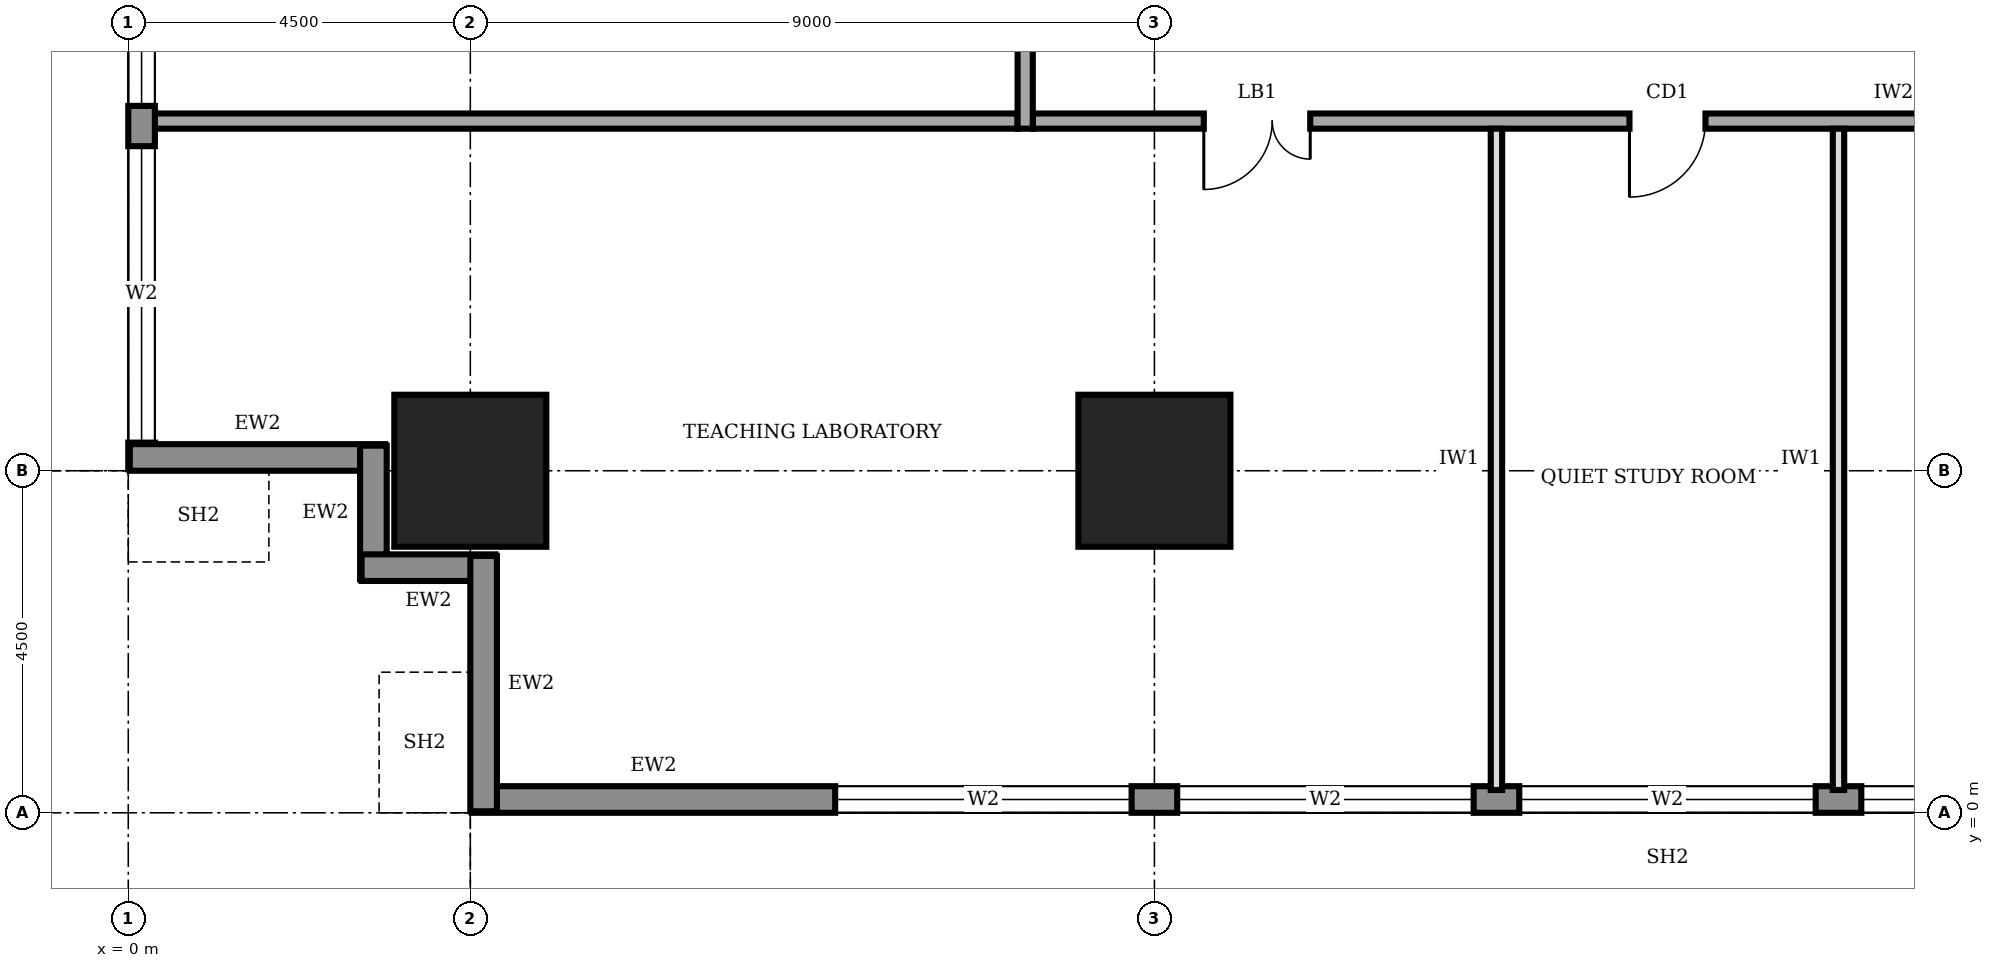
"""IFC4 building model, lengths in metres.
Left out: names, types, materials, properties, quantities, classifications, styles, units other than length and angle.
Written with IfcOpenShell. Run it as: python <this file> out.ifc"""

import sys

from ifc_helpers import new_model, si_unit, direction, frame, frame_2d, origin, origin_2d, place, context, subcontext, project, spatial, rectangle, extrude, element, fill, save


model = new_model("IFC4")
c1 = context("Model", 3, precision=1e-05, world=origin(), true_north=direction((0.0, 1.0)))
c2 = subcontext(c1, "Body", "Model", "MODEL_VIEW")
j1 = project(units=[si_unit("LENGTHUNIT", "METRE"), si_unit("PLANEANGLEUNIT", "RADIAN")], contexts=[c1])
p1 = place(None, origin())
s1 = spatial("IfcSite", under=j1, at=p1, CompositionType="ELEMENT")
p2 = place(p1, origin())
s2 = spatial("IfcBuilding", under=s1, at=p2, CompositionType="ELEMENT")
p3 = place(p2, frame((0.0, 0.0, 65.0)))
s3 = spatial("IfcBuildingStorey", under=s2, at=p3, CompositionType="ELEMENT", Elevation=65.0)
for number, where, z_axis, x_axis in (
    (1, (4.5, 4.5, 0.0), (0.0, 0.0, 1.0), (1.0, 0.0, 0.0)),
    (2, (13.5, 4.5, 0.0), (0.0, 0.0, 1.0), (1.0, 0.0, 0.0)),
):
    element("IfcColumn", number, at=place(p3, frame(where, z_axis=z_axis, x_axis=x_axis)), inside=s3, PredefinedType="COLUMN", context=c2, shape_type="SweptSolid", body=[
        extrude(rectangle(XDim=2.0, YDim=2.0, at=origin_2d()), origin(), (0.0, 0.0, 1.0), 4.0),
    ])
p4 = place(p3, frame((4.52, 0.175, 0.0), z_axis=(0.0, 0.0, 1.0), x_axis=(1.0, 0.0, 0.0)))
e3 = element("IfcWall", 3, at=p4, inside=s3, PredefinedType="STANDARD", context=c2, shape_type="SweptSolid", body=[
    extrude(rectangle(XDim=31.46, YDim=0.35, at=frame_2d((15.73, 0.0))), origin(), (0.0, 0.0, 1.0), 3.75),
])
p5 = place(p4, frame((4.78, 0.0, 0.6)))
e4 = element("IfcOpeningElement", 4, at=p5, cuts=e3, PredefinedType="OPENING", context=c2, shape_type="SweptSolid", body=[
    extrude(rectangle(XDim=3.9, YDim=2.6, at=frame_2d((1.95, 1.3))), frame((0.0, 0.185, 0.0), z_axis=(0.0, -1.0, 0.0), x_axis=(1.0, 0.0, 0.0)), (0.0, 0.0, 1.0), 0.37),
])
p6 = place(p4, frame((9.28, 0.0, 0.6)))
e5 = element("IfcOpeningElement", 5, at=p6, cuts=e3, PredefinedType="OPENING", context=c2, shape_type="SweptSolid", body=[
    extrude(rectangle(XDim=3.9, YDim=2.6, at=frame_2d((1.95, 1.3))), frame((0.0, 0.185, 0.0), z_axis=(0.0, -1.0, 0.0), x_axis=(1.0, 0.0, 0.0)), (0.0, 0.0, 1.0), 0.37),
])
p7 = place(p4, frame((13.78, 0.0, 0.6)))
e6 = element("IfcOpeningElement", 6, at=p7, cuts=e3, PredefinedType="OPENING", context=c2, shape_type="SweptSolid", body=[
    extrude(rectangle(XDim=3.9, YDim=2.6, at=frame_2d((1.95, 1.3))), frame((0.0, 0.185, 0.0), z_axis=(0.0, -1.0, 0.0), x_axis=(1.0, 0.0, 0.0)), (0.0, 0.0, 1.0), 0.37),
])
p8 = place(p4, frame((18.28, 0.0, 0.6)))
e7 = element("IfcOpeningElement", 7, at=p8, cuts=e3, PredefinedType="OPENING", context=c2, shape_type="SweptSolid", body=[
    extrude(rectangle(XDim=3.9, YDim=2.6, at=frame_2d((1.95, 1.3))), frame((0.0, 0.185, 0.0), z_axis=(0.0, -1.0, 0.0), x_axis=(1.0, 0.0, 0.0)), (0.0, 0.0, 1.0), 0.37),
])
p9 = place(p4, frame((22.78, 0.0, 0.6)))
e8 = element("IfcOpeningElement", 8, at=p9, cuts=e3, PredefinedType="OPENING", context=c2, shape_type="SweptSolid", body=[
    extrude(rectangle(XDim=3.9, YDim=2.6, at=frame_2d((1.95, 1.3))), frame((0.0, 0.185, 0.0), z_axis=(0.0, -1.0, 0.0), x_axis=(1.0, 0.0, 0.0)), (0.0, 0.0, 1.0), 0.37),
])
p10 = place(p4, frame((27.21, 0.0, 0.6)))
e9 = element("IfcOpeningElement", 9, at=p10, cuts=e3, PredefinedType="OPENING", context=c2, shape_type="SweptSolid", body=[
    extrude(rectangle(XDim=3.9, YDim=2.6, at=frame_2d((1.95, 1.3))), frame((0.0, 0.185, 0.0), z_axis=(0.0, -1.0, 0.0), x_axis=(1.0, 0.0, 0.0)), (0.0, 0.0, 1.0), 0.37),
])
p11 = place(p3, frame((0.175, 35.98, 0.0), z_axis=(0.0, 0.0, 1.0), x_axis=(0.0, -1.0, 0.0)))
e10 = element("IfcWall", 10, at=p11, inside=s3, PredefinedType="STANDARD", context=c2, shape_type="SweptSolid", body=[
    extrude(rectangle(XDim=31.46, YDim=0.35, at=frame_2d((15.73, 0.0))), origin(), (0.0, 0.0, 1.0), 3.75),
])
p12 = place(p11, frame((27.21, 0.0, 0.6)))
e11 = element("IfcOpeningElement", 11, at=p12, cuts=e10, PredefinedType="OPENING", context=c2, shape_type="SweptSolid", body=[
    extrude(rectangle(XDim=3.9, YDim=2.6, at=frame_2d((1.95, 1.3))), frame((0.0, 0.185, 0.0), z_axis=(0.0, -1.0, 0.0), x_axis=(1.0, 0.0, 0.0)), (0.0, 0.0, 1.0), 0.37),
])
p13 = place(p11, frame((22.78, 0.0, 0.6)))
e12 = element("IfcOpeningElement", 12, at=p13, cuts=e10, PredefinedType="OPENING", context=c2, shape_type="SweptSolid", body=[
    extrude(rectangle(XDim=3.9, YDim=2.6, at=frame_2d((1.95, 1.3))), frame((0.0, 0.185, 0.0), z_axis=(0.0, -1.0, 0.0), x_axis=(1.0, 0.0, 0.0)), (0.0, 0.0, 1.0), 0.37),
])
p14 = place(p11, frame((18.28, 0.0, 0.6)))
e13 = element("IfcOpeningElement", 13, at=p14, cuts=e10, PredefinedType="OPENING", context=c2, shape_type="SweptSolid", body=[
    extrude(rectangle(XDim=3.9, YDim=2.6, at=frame_2d((1.95, 1.3))), frame((0.0, 0.185, 0.0), z_axis=(0.0, -1.0, 0.0), x_axis=(1.0, 0.0, 0.0)), (0.0, 0.0, 1.0), 0.37),
])
p15 = place(p11, frame((13.78, 0.0, 0.6)))
e14 = element("IfcOpeningElement", 14, at=p15, cuts=e10, PredefinedType="OPENING", context=c2, shape_type="SweptSolid", body=[
    extrude(rectangle(XDim=3.9, YDim=2.6, at=frame_2d((1.95, 1.3))), frame((0.0, 0.185, 0.0), z_axis=(0.0, -1.0, 0.0), x_axis=(1.0, 0.0, 0.0)), (0.0, 0.0, 1.0), 0.37),
])
p16 = place(p11, frame((9.28, 0.0, 0.6)))
e15 = element("IfcOpeningElement", 15, at=p16, cuts=e10, PredefinedType="OPENING", context=c2, shape_type="SweptSolid", body=[
    extrude(rectangle(XDim=3.9, YDim=2.6, at=frame_2d((1.95, 1.3))), frame((0.0, 0.185, 0.0), z_axis=(0.0, -1.0, 0.0), x_axis=(1.0, 0.0, 0.0)), (0.0, 0.0, 1.0), 0.37),
])
p17 = place(p11, frame((4.78, 0.0, 0.6)))
e16 = element("IfcOpeningElement", 16, at=p17, cuts=e10, PredefinedType="OPENING", context=c2, shape_type="SweptSolid", body=[
    extrude(rectangle(XDim=3.9, YDim=2.6, at=frame_2d((1.95, 1.3))), frame((0.0, 0.185, 0.0), z_axis=(0.0, -1.0, 0.0), x_axis=(1.0, 0.0, 0.0)), (0.0, 0.0, 1.0), 0.37),
])
p18 = place(p3, frame((0.02, 4.675, 0.0), z_axis=(0.0, 0.0, 1.0), x_axis=(1.0, 0.0, 0.0)))
e17 = element("IfcWall", 17, at=p18, inside=s3, PredefinedType="STANDARD", context=c2, shape_type="SweptSolid", body=[
    extrude(rectangle(XDim=3.36, YDim=0.35, at=frame_2d((1.68, 0.0))), origin(), (0.0, 0.0, 1.0), 2.85),
])
for number, where, z_axis, x_axis in (
    (18, (3.225, 4.83, 0.0), (0.0, 0.0, 1.0), (0.0, -1.0, 0.0)),
    (19, (3.07, 3.225, 0.0), (0.0, 0.0, 1.0), (1.0, 0.0, 0.0)),
):
    element("IfcWall", number, at=place(p3, frame(where, z_axis=z_axis, x_axis=x_axis)), inside=s3, PredefinedType="STANDARD", context=c2, shape_type="SweptSolid", body=[
        extrude(rectangle(XDim=1.76, YDim=0.35, at=frame_2d((0.88, 0.0))), origin(), (0.0, 0.0, 1.0), 3.75),
    ])
p19 = place(p3, frame((4.675, 3.38, 0.0), z_axis=(0.0, 0.0, 1.0), x_axis=(0.0, -1.0, 0.0)))
e20 = element("IfcWall", 20, at=p19, inside=s3, PredefinedType="STANDARD", context=c2, shape_type="SweptSolid", body=[
    extrude(rectangle(XDim=3.36, YDim=0.35, at=frame_2d((1.68, 0.0))), origin(), (0.0, 0.0, 1.0), 2.85),
])
p20 = place(p3, frame((11.9, 9.1, 0.0), z_axis=(0.0, 0.0, 1.0), x_axis=(1.0, 0.0, 0.0)))
e21 = element("IfcWall", 21, at=p20, inside=s3, PredefinedType="SOLIDWALL", context=c2, shape_type="SweptSolid", body=[
    extrude(rectangle(XDim=18.4, YDim=0.2, at=frame_2d((9.2, 0.0))), origin(), (0.0, 0.0, 1.0), 3.75),
])
p21 = place(p20, frame((2.25, 0.0, 0.0)))
e22 = element("IfcOpeningElement", 22, at=p21, cuts=e21, PredefinedType="OPENING", context=c2, shape_type="SweptSolid", body=[
    extrude(rectangle(XDim=1.4, YDim=2.1, at=frame_2d((0.7, 1.05))), frame((0.0, 0.11, 0.0), z_axis=(0.0, -1.0, 0.0), x_axis=(1.0, 0.0, 0.0)), (0.0, 0.0, 1.0), 0.22),
])
p22 = place(p20, frame((7.85, 0.0, 0.0)))
e23 = element("IfcOpeningElement", 23, at=p22, cuts=e21, PredefinedType="OPENING", context=c2, shape_type="SweptSolid", body=[
    extrude(rectangle(XDim=1.0, YDim=2.1, at=frame_2d((0.5, 1.05))), frame((0.0, 0.11, 0.0), z_axis=(0.0, -1.0, 0.0), x_axis=(1.0, 0.0, 0.0)), (0.0, 0.0, 1.0), 0.22),
])
p23 = place(p20, frame((13.8, 0.0, 0.0)))
e24 = element("IfcOpeningElement", 24, at=p23, cuts=e21, PredefinedType="OPENING", context=c2, shape_type="SweptSolid", body=[
    extrude(rectangle(XDim=1.4, YDim=2.1, at=frame_2d((0.7, 1.05))), frame((0.0, 0.11, 0.0), z_axis=(0.0, -1.0, 0.0), x_axis=(1.0, 0.0, 0.0)), (0.0, 0.0, 1.0), 0.22),
])
p24 = place(p3, frame((11.8, 31.3, 0.0), z_axis=(0.0, 0.0, 1.0), x_axis=(0.0, -1.0, 0.0)))
e25 = element("IfcWall", 25, at=p24, inside=s3, PredefinedType="SOLIDWALL", context=c2, shape_type="SweptSolid", body=[
    extrude(rectangle(XDim=22.3, YDim=0.2, at=frame_2d((11.15, 0.0))), origin(), (0.0, 0.0, 1.0), 3.75),
])
p25 = place(p24, frame((19.55, 0.0, 0.0)))
e26 = element("IfcOpeningElement", 26, at=p25, cuts=e25, PredefinedType="OPENING", context=c2, shape_type="SweptSolid", body=[
    extrude(rectangle(XDim=1.0, YDim=2.1, at=frame_2d((0.5, 1.05))), frame((0.0, 0.11, 0.0), z_axis=(0.0, -1.0, 0.0), x_axis=(1.0, 0.0, 0.0)), (0.0, 0.0, 1.0), 0.22),
])
p26 = place(p24, frame((15.45, 0.0, 0.0)))
e27 = element("IfcOpeningElement", 27, at=p26, cuts=e25, PredefinedType="OPENING", context=c2, shape_type="SweptSolid", body=[
    extrude(rectangle(XDim=0.9, YDim=2.1, at=frame_2d((0.45, 1.05))), frame((0.0, 0.11, 0.0), z_axis=(0.0, -1.0, 0.0), x_axis=(1.0, 0.0, 0.0)), (0.0, 0.0, 1.0), 0.22),
])
p27 = place(p24, frame((12.45, 0.0, 0.0)))
e28 = element("IfcOpeningElement", 28, at=p27, cuts=e25, PredefinedType="OPENING", context=c2, shape_type="SweptSolid", body=[
    extrude(rectangle(XDim=0.9, YDim=2.1, at=frame_2d((0.45, 1.05))), frame((0.0, 0.11, 0.0), z_axis=(0.0, -1.0, 0.0), x_axis=(1.0, 0.0, 0.0)), (0.0, 0.0, 1.0), 0.22),
])
p28 = place(p24, frame((7.6, 0.0, 0.0)))
e29 = element("IfcOpeningElement", 29, at=p28, cuts=e25, PredefinedType="OPENING", context=c2, shape_type="SweptSolid", body=[
    extrude(rectangle(XDim=0.9, YDim=2.1, at=frame_2d((0.45, 1.05))), frame((0.0, 0.11, 0.0), z_axis=(0.0, -1.0, 0.0), x_axis=(1.0, 0.0, 0.0)), (0.0, 0.0, 1.0), 0.22),
])
p29 = place(p24, frame((4.8, 0.0, 0.0)))
e30 = element("IfcOpeningElement", 30, at=p29, cuts=e25, PredefinedType="OPENING", context=c2, shape_type="SweptSolid", body=[
    extrude(rectangle(XDim=1.0, YDim=2.1, at=frame_2d((0.5, 1.05))), frame((0.0, 0.11, 0.0), z_axis=(0.0, -1.0, 0.0), x_axis=(1.0, 0.0, 0.0)), (0.0, 0.0, 1.0), 0.22),
])
p30 = place(p24, frame((10.3, 0.0, 0.0)))
e31 = element("IfcOpeningElement", 31, at=p30, cuts=e25, PredefinedType="OPENING", context=c2, shape_type="SweptSolid", body=[
    extrude(rectangle(XDim=1.0, YDim=2.1, at=frame_2d((0.5, 1.05))), frame((0.0, 0.11, 0.0), z_axis=(0.0, -1.0, 0.0), x_axis=(1.0, 0.0, 0.0)), (0.0, 0.0, 1.0), 0.22),
])
p31 = place(p24, frame((1.55, 0.0, 0.0)))
e32 = element("IfcOpeningElement", 32, at=p31, cuts=e25, PredefinedType="OPENING", context=c2, shape_type="SweptSolid", body=[
    extrude(rectangle(XDim=1.0, YDim=2.1, at=frame_2d((0.5, 1.05))), frame((0.0, 0.11, 0.0), z_axis=(0.0, -1.0, 0.0), x_axis=(1.0, 0.0, 0.0)), (0.0, 0.0, 1.0), 0.22),
])
p32 = place(p3, frame((0.3, 9.1, 0.0), z_axis=(0.0, 0.0, 1.0), x_axis=(1.0, 0.0, 0.0)))
e33 = element("IfcWall", 33, at=p32, inside=s3, PredefinedType="SOLIDWALL", context=c2, shape_type="SweptSolid", body=[
    extrude(rectangle(XDim=11.4, YDim=0.2, at=frame_2d((5.7, 0.0))), origin(), (0.0, 0.0, 1.0), 3.75),
])
for number, where, z_axis, x_axis in (
    (34, (18.0, 0.3, 0.0), (0.0, 0.0, 1.0), (0.0, 1.0, 0.0)),
    (35, (22.5, 0.3, 0.0), (0.0, 0.0, 1.0), (0.0, 1.0, 0.0)),
):
    element("IfcWall", number, at=place(p3, frame(where, z_axis=z_axis, x_axis=x_axis)), inside=s3, PredefinedType="PARTITIONING", context=c2, shape_type="SweptSolid", body=[
        extrude(rectangle(XDim=8.7, YDim=0.15, at=frame_2d((4.35, 0.0))), origin(), (0.0, 0.0, 1.0), 3.75),
    ])
p33 = place(p5, origin())
e36 = element("IfcWindow", 36, at=p33, inside=s3, PartitioningType="SINGLE_PANEL", PredefinedType="WINDOW", context=c2, shape_type="SweptSolid", body=[
    extrude(rectangle(XDim=3.9, YDim=2.6, at=frame_2d((1.95, 1.3))), frame((0.0, 0.03, 0.0), z_axis=(0.0, -1.0, 0.0), x_axis=(1.0, 0.0, 0.0)), (0.0, 0.0, 1.0), 0.06),
])
fill(e4, e36)
p34 = place(p6, origin())
e37 = element("IfcWindow", 37, at=p34, inside=s3, PartitioningType="SINGLE_PANEL", PredefinedType="WINDOW", context=c2, shape_type="SweptSolid", body=[
    extrude(rectangle(XDim=3.9, YDim=2.6, at=frame_2d((1.95, 1.3))), frame((0.0, 0.03, 0.0), z_axis=(0.0, -1.0, 0.0), x_axis=(1.0, 0.0, 0.0)), (0.0, 0.0, 1.0), 0.06),
])
fill(e5, e37)
p35 = place(p7, origin())
e38 = element("IfcWindow", 38, at=p35, inside=s3, PartitioningType="SINGLE_PANEL", PredefinedType="WINDOW", context=c2, shape_type="SweptSolid", body=[
    extrude(rectangle(XDim=3.9, YDim=2.6, at=frame_2d((1.95, 1.3))), frame((0.0, 0.03, 0.0), z_axis=(0.0, -1.0, 0.0), x_axis=(1.0, 0.0, 0.0)), (0.0, 0.0, 1.0), 0.06),
])
fill(e6, e38)
p36 = place(p8, origin())
e39 = element("IfcWindow", 39, at=p36, inside=s3, PartitioningType="SINGLE_PANEL", PredefinedType="WINDOW", context=c2, shape_type="SweptSolid", body=[
    extrude(rectangle(XDim=3.9, YDim=2.6, at=frame_2d((1.95, 1.3))), frame((0.0, 0.03, 0.0), z_axis=(0.0, -1.0, 0.0), x_axis=(1.0, 0.0, 0.0)), (0.0, 0.0, 1.0), 0.06),
])
fill(e7, e39)
p37 = place(p12, origin())
e40 = element("IfcWindow", 40, at=p37, inside=s3, PartitioningType="SINGLE_PANEL", PredefinedType="WINDOW", context=c2, shape_type="SweptSolid", body=[
    extrude(rectangle(XDim=3.9, YDim=2.6, at=frame_2d((1.95, 1.3))), frame((0.0, 0.03, 0.0), z_axis=(0.0, -1.0, 0.0), x_axis=(1.0, 0.0, 0.0)), (0.0, 0.0, 1.0), 0.06),
])
fill(e11, e40)
p38 = place(p13, origin())
e41 = element("IfcWindow", 41, at=p38, inside=s3, PartitioningType="SINGLE_PANEL", PredefinedType="WINDOW", context=c2, shape_type="SweptSolid", body=[
    extrude(rectangle(XDim=3.9, YDim=2.6, at=frame_2d((1.95, 1.3))), frame((0.0, 0.03, 0.0), z_axis=(0.0, -1.0, 0.0), x_axis=(1.0, 0.0, 0.0)), (0.0, 0.0, 1.0), 0.06),
])
fill(e12, e41)
p39 = place(p21, frame((1.4, 0.0, 0.0), z_axis=(0.0, 0.0, 1.0), x_axis=(-1.0, 0.0, 0.0)))
e42 = element("IfcDoor", 42, at=p39, inside=s3, OperationType="DOUBLE_DOOR_SINGLE_SWING", PredefinedType="DOOR", context=c2, shape_type="SweptSolid", body=[
    extrude(rectangle(XDim=1.4, YDim=2.1, at=frame_2d((0.7, 1.05))), frame((0.0, 0.025, 0.0), z_axis=(0.0, -1.0, 0.0), x_axis=(1.0, 0.0, 0.0)), (0.0, 0.0, 1.0), 0.05),
])
fill(e22, e42)
p40 = place(p22, frame((1.0, 0.0, 0.0), z_axis=(0.0, 0.0, 1.0), x_axis=(-1.0, 0.0, 0.0)))
e43 = element("IfcDoor", 43, at=p40, inside=s3, OperationType="SINGLE_SWING_RIGHT", PredefinedType="DOOR", context=c2, shape_type="SweptSolid", body=[
    extrude(rectangle(XDim=1.0, YDim=2.1, at=frame_2d((0.5, 1.05))), frame((0.0, 0.025, 0.0), z_axis=(0.0, -1.0, 0.0), x_axis=(1.0, 0.0, 0.0)), (0.0, 0.0, 1.0), 0.05),
])
fill(e23, e43)
save(model, sys.argv[1])
